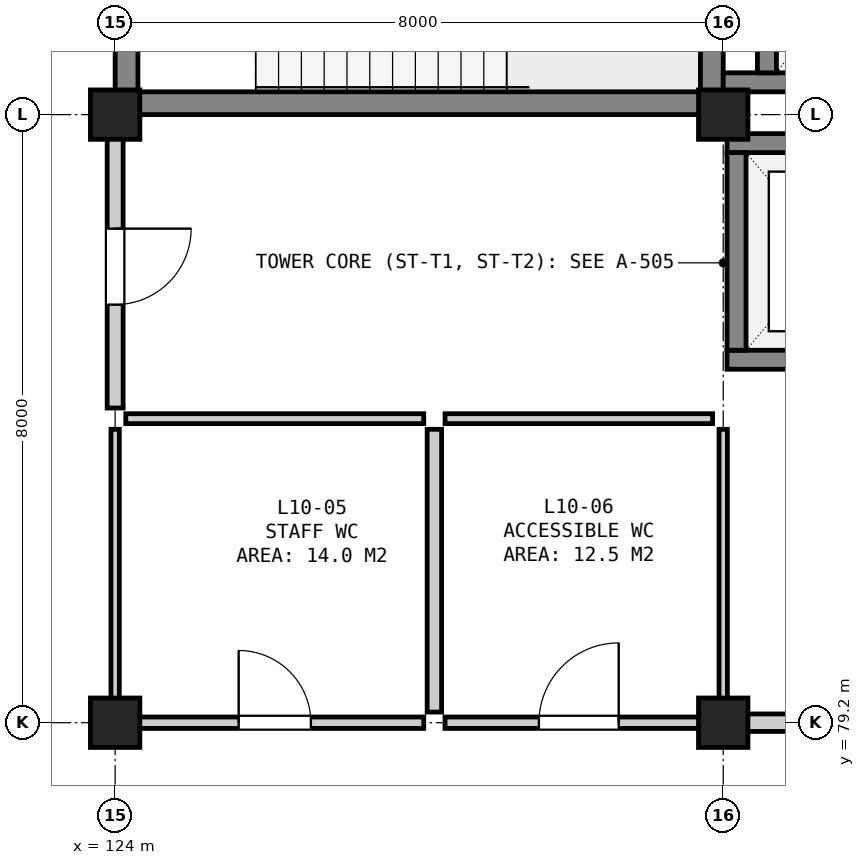
"""IFC4 building model, lengths in metres.
Left out: names, types, materials, properties, quantities, classifications, styles, units other than length and angle.
Written with IfcOpenShell. Run it as: python <this file> out.ifc"""

import sys

from ifc_helpers import new_model, si_unit, direction, frame, frame_2d, origin, origin_2d, place, context, subcontext, project, spatial, rectangle, extrude, element, fill, save


model = new_model("IFC4")
c1 = context("Model", 3, precision=1e-05, world=origin(), true_north=direction((0.0, 1.0)))
c2 = subcontext(c1, "Body", "Model", "MODEL_VIEW")
j1 = project(units=[si_unit("LENGTHUNIT", "METRE"), si_unit("PLANEANGLEUNIT", "RADIAN")], contexts=[c1])
p1 = place(None, origin())
s1 = spatial("IfcSite", under=j1, at=p1, CompositionType="ELEMENT")
p2 = place(p1, origin())
s2 = spatial("IfcBuilding", under=s1, at=p2, CompositionType="ELEMENT")
p3 = place(p2, frame((0.0, 0.0, 43.3)))
s3 = spatial("IfcBuildingStorey", under=s2, at=p3, CompositionType="ELEMENT", Elevation=43.3)
for number, where, z_axis, x_axis in (
    (1, (124.0, 79.2, 0.0), (0.0, 0.0, 1.0), (1.0, 0.0, 0.0)),
    (2, (124.0, 87.2, 0.0), (0.0, 0.0, 1.0), (1.0, 0.0, 0.0)),
    (3, (132.0, 79.2, 0.0), (0.0, 0.0, 1.0), (1.0, 0.0, 0.0)),
    (4, (132.0, 87.2, 0.0), (0.0, 0.0, 1.0), (1.0, 0.0, 0.0)),
):
    element("IfcColumn", number, at=place(p3, frame(where, z_axis=z_axis, x_axis=x_axis)), inside=s3, PredefinedType="COLUMN", context=c2, shape_type="SweptSolid", body=[
        extrude(rectangle(XDim=0.65, YDim=0.65, at=origin_2d()), origin(), (0.0, 0.0, 1.0), 3.8),
    ])
for number, where, z_axis, x_axis in (
    (5, (124.15, 87.2, 0.0), (0.0, 0.0, 1.0), (0.0, 1.0, 0.0)),
    (6, (131.85, 87.2, 0.0), (0.0, 0.0, 1.0), (0.0, 1.0, 0.0)),
):
    element("IfcWall", number, at=place(p3, frame(where, z_axis=z_axis, x_axis=x_axis)), inside=s3, PredefinedType="SHEAR", context=c2, shape_type="SweptSolid", body=[
        extrude(rectangle(XDim=4.2, YDim=0.3, at=frame_2d((2.1, 0.0))), origin(), (0.0, 0.0, 1.0), 3.52),
    ])
p4 = place(p3, frame((124.3, 87.35, 0.0), z_axis=(0.0, 0.0, 1.0), x_axis=(1.0, 0.0, 0.0)))
e7 = element("IfcWall", 7, at=p4, inside=s3, PredefinedType="SHEAR", context=c2, shape_type="SweptSolid", body=[
    extrude(rectangle(XDim=7.4, YDim=0.3, at=frame_2d((3.7, 0.0))), origin(), (0.0, 0.0, 1.0), 3.52),
])
p5 = place(p3, frame((132.0, 87.625, 0.0), z_axis=(0.0, 0.0, 1.0), x_axis=(1.0, 0.0, 0.0)))
e8 = element("IfcWall", 8, at=p5, inside=s3, PredefinedType="SHEAR", context=c2, shape_type="SweptSolid", body=[
    extrude(rectangle(XDim=3.15, YDim=0.25, at=frame_2d((1.575, 0.0))), origin(), (0.0, 0.0, 1.0), 3.52),
])
p6 = place(p3, frame((132.575, 87.75, 0.0), z_axis=(0.0, 0.0, 1.0), x_axis=(0.0, 1.0, 0.0)))
e9 = element("IfcWall", 9, at=p6, inside=s3, PredefinedType="SHEAR", context=c2, shape_type="SweptSolid", body=[
    extrude(rectangle(XDim=2.9, YDim=0.25, at=frame_2d((1.45, 0.0))), origin(), (0.0, 0.0, 1.0), 3.52),
])
p7 = place(p3, frame((132.05, 83.975, 0.0), z_axis=(0.0, 0.0, 1.0), x_axis=(1.0, 0.0, 0.0)))
e10 = element("IfcWall", 10, at=p7, inside=s3, PredefinedType="SHEAR", context=c2, shape_type="SweptSolid", body=[
    extrude(rectangle(XDim=2.7, YDim=0.25, at=frame_2d((1.35, 0.0))), origin(), (0.0, 0.0, 1.0), 3.52),
])
p8 = place(p7, frame((0.8, 0.0, 0.0)))
e11 = element("IfcOpeningElement", 11, at=p8, cuts=e10, PredefinedType="OPENING", context=c2, shape_type="SweptSolid", body=[
    extrude(rectangle(XDim=1.1, YDim=2.15, at=frame_2d((0.55, 1.075))), frame((0.0, 0.137, 0.0), z_axis=(0.0, -1.0, 0.0), x_axis=(1.0, 0.0, 0.0)), (0.0, 0.0, 1.0), 0.274),
])
p9 = place(p3, frame((132.05, 86.825, 0.0), z_axis=(0.0, 0.0, 1.0), x_axis=(1.0, 0.0, 0.0)))
e12 = element("IfcWall", 12, at=p9, inside=s3, PredefinedType="SHEAR", context=c2, shape_type="SweptSolid", body=[
    extrude(rectangle(XDim=2.7, YDim=0.25, at=frame_2d((1.35, 0.0))), origin(), (0.0, 0.0, 1.0), 3.52),
])
p10 = place(p3, frame((132.175, 84.1, 0.0), z_axis=(0.0, 0.0, 1.0), x_axis=(0.0, 1.0, 0.0)))
e13 = element("IfcWall", 13, at=p10, inside=s3, PredefinedType="SHEAR", context=c2, shape_type="SweptSolid", body=[
    extrude(rectangle(XDim=2.6, YDim=0.25, at=frame_2d((1.3, 0.0))), origin(), (0.0, 0.0, 1.0), 3.52),
])
p11 = place(p3, frame((124.14, 79.2, 0.0), z_axis=(0.0, 0.0, 1.0), x_axis=(1.0, 0.0, 0.0)))
e14 = element("IfcWall", 14, at=p11, inside=s3, PredefinedType="PARTITIONING", context=c2, shape_type="SweptSolid", body=[
    extrude(rectangle(XDim=3.92, YDim=0.15, at=frame_2d((1.96, 0.0))), origin(), (0.0, 0.0, 1.0), 2.945),
])
p12 = place(p11, frame((1.485, 0.0, 0.0)))
e15 = element("IfcOpeningElement", 15, at=p12, cuts=e14, PredefinedType="OPENING", context=c2, shape_type="SweptSolid", body=[
    extrude(rectangle(XDim=0.95, YDim=2.15, at=frame_2d((0.475, 1.075))), frame((0.0, 0.087, 0.0), z_axis=(0.0, -1.0, 0.0), x_axis=(1.0, 0.0, 0.0)), (0.0, 0.0, 1.0), 0.174),
])
p13 = place(p3, frame((124.14, 83.2, 0.0), z_axis=(0.0, 0.0, 1.0), x_axis=(1.0, 0.0, 0.0)))
e16 = element("IfcWall", 16, at=p13, inside=s3, PredefinedType="PARTITIONING", context=c2, shape_type="SweptSolid", body=[
    extrude(rectangle(XDim=3.92, YDim=0.13, at=frame_2d((1.96, 0.0))), origin(), (0.0, 0.0, 1.0), 3.52),
])
p14 = place(p3, frame((124.0, 79.34, 0.0), z_axis=(0.0, 0.0, 1.0), x_axis=(0.0, 1.0, 0.0)))
e17 = element("IfcWall", 17, at=p14, inside=s3, PredefinedType="PARTITIONING", context=c2, shape_type="SweptSolid", body=[
    extrude(rectangle(XDim=3.72, YDim=0.11, at=frame_2d((1.86, 0.0))), origin(), (0.0, 0.0, 1.0), 3.045),
])
p15 = place(p3, frame((128.2, 79.34, 0.0), z_axis=(0.0, 0.0, 1.0), x_axis=(0.0, 1.0, 0.0)))
e18 = element("IfcWall", 18, at=p15, inside=s3, PredefinedType="PARTITIONING", context=c2, shape_type="SweptSolid", body=[
    extrude(rectangle(XDim=3.72, YDim=0.19, at=frame_2d((1.86, 0.0))), origin(), (0.0, 0.0, 1.0), 3.52),
])
p16 = place(p3, frame((128.34, 79.2, 0.0), z_axis=(0.0, 0.0, 1.0), x_axis=(1.0, 0.0, 0.0)))
e19 = element("IfcWall", 19, at=p16, inside=s3, PredefinedType="PARTITIONING", context=c2, shape_type="SweptSolid", body=[
    extrude(rectangle(XDim=3.52, YDim=0.15, at=frame_2d((1.76, 0.0))), origin(), (0.0, 0.0, 1.0), 2.945),
])
p17 = place(p16, frame((1.235, 0.0, 0.0)))
e20 = element("IfcOpeningElement", 20, at=p17, cuts=e19, PredefinedType="OPENING", context=c2, shape_type="SweptSolid", body=[
    extrude(rectangle(XDim=1.05, YDim=2.15, at=frame_2d((0.525, 1.075))), frame((0.0, 0.087, 0.0), z_axis=(0.0, -1.0, 0.0), x_axis=(1.0, 0.0, 0.0)), (0.0, 0.0, 1.0), 0.174),
])
p18 = place(p3, frame((128.34, 83.2, 0.0), z_axis=(0.0, 0.0, 1.0), x_axis=(1.0, 0.0, 0.0)))
e21 = element("IfcWall", 21, at=p18, inside=s3, PredefinedType="PARTITIONING", context=c2, shape_type="SweptSolid", body=[
    extrude(rectangle(XDim=3.52, YDim=0.13, at=frame_2d((1.76, 0.0))), origin(), (0.0, 0.0, 1.0), 3.52),
])
p19 = place(p3, frame((132.0, 79.34, 0.0), z_axis=(0.0, 0.0, 1.0), x_axis=(0.0, 1.0, 0.0)))
e22 = element("IfcWall", 22, at=p19, inside=s3, PredefinedType="PARTITIONING", context=c2, shape_type="SweptSolid", body=[
    extrude(rectangle(XDim=3.72, YDim=0.11, at=frame_2d((1.86, 0.0))), origin(), (0.0, 0.0, 1.0), 2.895),
])
p20 = place(p3, frame((124.0, 83.34, 0.0), z_axis=(0.0, 0.0, 1.0), x_axis=(0.0, 1.0, 0.0)))
e23 = element("IfcWall", 23, at=p20, inside=s3, PredefinedType="SOLIDWALL", context=c2, shape_type="SweptSolid", body=[
    extrude(rectangle(XDim=3.72, YDim=0.21, at=frame_2d((1.86, 0.0))), origin(), (0.0, 0.0, 1.0), 3.045),
])
p21 = place(p20, frame((1.36, 0.0, 0.0)))
e24 = element("IfcOpeningElement", 24, at=p21, cuts=e23, PredefinedType="OPENING", context=c2, shape_type="SweptSolid", body=[
    extrude(rectangle(XDim=1.0, YDim=2.15, at=frame_2d((0.5, 1.075))), frame((0.0, 0.117, 0.0), z_axis=(0.0, -1.0, 0.0), x_axis=(1.0, 0.0, 0.0)), (0.0, 0.0, 1.0), 0.234),
])
p22 = place(p3, frame((132.14, 79.2, 0.0), z_axis=(0.0, 0.0, 1.0), x_axis=(1.0, 0.0, 0.0)))
e25 = element("IfcWall", 25, at=p22, inside=s3, PredefinedType="SOLIDWALL", context=c2, shape_type="SweptSolid", body=[
    extrude(rectangle(XDim=7.72, YDim=0.23, at=frame_2d((3.86, 0.0))), origin(), (0.0, 0.0, 1.0), 2.995),
])
p23 = place(p22, frame((3.11, 0.0, 0.0)))
e26 = element("IfcOpeningElement", 26, at=p23, cuts=e25, PredefinedType="OPENING", context=c2, shape_type="SweptSolid", body=[
    extrude(rectangle(XDim=1.5, YDim=2.2, at=frame_2d((0.75, 1.1))), frame((0.0, 0.127, 0.0), z_axis=(0.0, -1.0, 0.0), x_axis=(1.0, 0.0, 0.0)), (0.0, 0.0, 1.0), 0.254),
])
p24 = place(p12, origin())
e27 = element("IfcDoor", 27, at=p24, inside=s3, OperationType="SINGLE_SWING_LEFT", PredefinedType="DOOR", context=c2, shape_type="SweptSolid", body=[
    extrude(rectangle(XDim=0.95, YDim=2.15, at=frame_2d((0.475, 1.075))), frame((0.0, 0.025, 0.0), z_axis=(0.0, -1.0, 0.0), x_axis=(1.0, 0.0, 0.0)), (0.0, 0.0, 1.0), 0.05),
])
fill(e15, e27)
p25 = place(p17, origin())
e28 = element("IfcDoor", 28, at=p25, inside=s3, OperationType="SINGLE_SWING_RIGHT", PredefinedType="DOOR", context=c2, shape_type="SweptSolid", body=[
    extrude(rectangle(XDim=1.05, YDim=2.15, at=frame_2d((0.525, 1.075))), frame((0.0, 0.025, 0.0), z_axis=(0.0, -1.0, 0.0), x_axis=(1.0, 0.0, 0.0)), (0.0, 0.0, 1.0), 0.05),
])
fill(e20, e28)
p26 = place(p21, frame((1.0, 0.0, 0.0), z_axis=(0.0, 0.0, 1.0), x_axis=(-1.0, 0.0, 0.0)))
e29 = element("IfcDoor", 29, at=p26, inside=s3, OperationType="SINGLE_SWING_LEFT", PredefinedType="DOOR", context=c2, shape_type="SweptSolid", body=[
    extrude(rectangle(XDim=1.0, YDim=2.15, at=frame_2d((0.5, 1.075))), frame((0.0, 0.025, 0.0), z_axis=(0.0, -1.0, 0.0), x_axis=(1.0, 0.0, 0.0)), (0.0, 0.0, 1.0), 0.05),
])
fill(e24, e29)
save(model, sys.argv[1])
